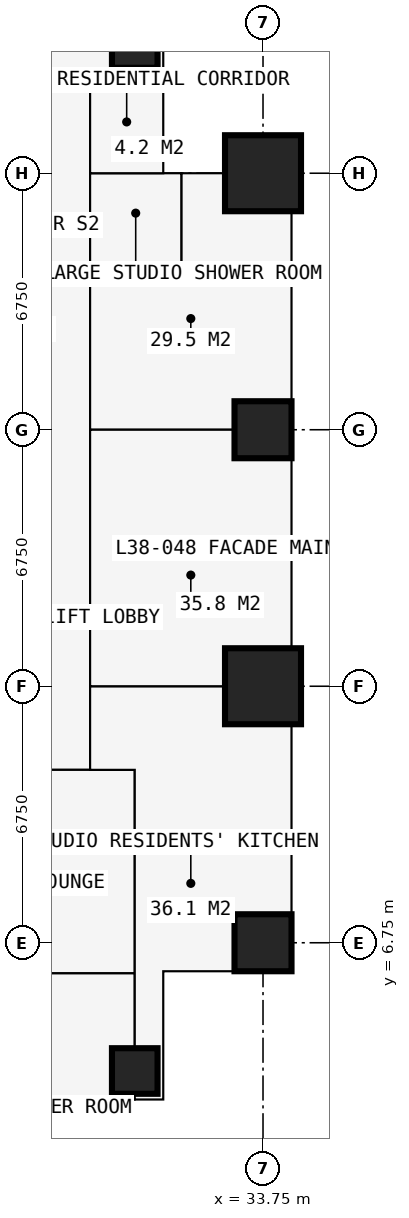
"""IFC4 building model, lengths in metres.
Left out: names, types, materials, properties, quantities, classifications, styles, units other than length and angle.
Written with IfcOpenShell. Run it as: python <this file> out.ifc"""

import sys

from ifc_helpers import new_model, si_unit, direction, frame, frame_2d, origin, origin_2d, place, context, subcontext, project, spatial, rectangle, extrude, element, fill, save


model = new_model("IFC4")
c1 = context("Model", 3, precision=1e-05, world=origin(), true_north=direction((0.0, 1.0)))
c2 = subcontext(c1, "Body", "Model", "MODEL_VIEW")
j1 = project(units=[si_unit("LENGTHUNIT", "METRE"), si_unit("PLANEANGLEUNIT", "RADIAN")], contexts=[c1])
p1 = place(None, origin())
s1 = spatial("IfcSite", under=j1, at=p1, CompositionType="ELEMENT")
p2 = place(p1, origin())
s2 = spatial("IfcBuilding", under=s1, at=p2, CompositionType="ELEMENT")
p3 = place(p2, frame((0.0, 0.0, 142.2)))
s3 = spatial("IfcBuildingStorey", under=s2, at=p3, CompositionType="ELEMENT", Elevation=142.2)
for number, where, z_axis, x_axis in (
    (1, (30.375, 3.375, 0.0), (0.0, 0.0, 1.0), (1.0, 0.0, 0.0)),
    (2, (30.375, 30.375, 0.0), (0.0, 0.0, 1.0), (1.0, 0.0, 0.0)),
):
    element("IfcColumn", number, at=place(p3, frame(where, z_axis=z_axis, x_axis=x_axis)), inside=s3, PredefinedType="COLUMN", context=c2, shape_type="SweptSolid", body=[
        extrude(rectangle(XDim=1.2, YDim=1.2, at=origin_2d()), origin(), (0.0, 0.0, 1.0), 3.6),
    ])
p4 = place(p3, frame((33.75, 6.75, 0.0), z_axis=(0.0, 0.0, 1.0), x_axis=(1.0, 0.0, 0.0)))
e3 = element("IfcColumn", 3, at=p4, inside=s3, PredefinedType="COLUMN", context=c2, shape_type="SweptSolid", body=[
    extrude(rectangle(XDim=1.5, YDim=1.5, at=origin_2d()), origin(), (0.0, 0.0, 1.0), 3.6),
])
p5 = place(p3, frame((33.75, 13.5, 0.0), z_axis=(0.0, 0.0, 1.0), x_axis=(1.0, 0.0, 0.0)))
e4 = element("IfcColumn", 4, at=p5, inside=s3, PredefinedType="COLUMN", context=c2, shape_type="SweptSolid", body=[
    extrude(rectangle(XDim=2.0, YDim=2.0, at=origin_2d()), origin(), (0.0, 0.0, 1.0), 3.6),
])
p6 = place(p3, frame((33.75, 20.25, 0.0), z_axis=(0.0, 0.0, 1.0), x_axis=(1.0, 0.0, 0.0)))
e5 = element("IfcColumn", 5, at=p6, inside=s3, PredefinedType="COLUMN", context=c2, shape_type="SweptSolid", body=[
    extrude(rectangle(XDim=1.5, YDim=1.5, at=origin_2d()), origin(), (0.0, 0.0, 1.0), 3.6),
])
p7 = place(p3, frame((33.75, 27.0, 0.0), z_axis=(0.0, 0.0, 1.0), x_axis=(1.0, 0.0, 0.0)))
e6 = element("IfcColumn", 6, at=p7, inside=s3, PredefinedType="COLUMN", context=c2, shape_type="SweptSolid", body=[
    extrude(rectangle(XDim=2.0, YDim=2.0, at=origin_2d()), origin(), (0.0, 0.0, 1.0), 3.6),
])
p8 = place(p3, frame((34.5, 20.25, 0.0), z_axis=(0.0, 0.0, 1.0), x_axis=(0.0, -1.0, 0.0)))
e7 = element("IfcWall", 7, at=p8, inside=s3, PredefinedType="SOLIDWALL", context=c2, shape_type="SweptSolid", body=[
    extrude(rectangle(XDim=6.75, YDim=0.15, at=frame_2d((3.375, 0.0))), origin(), (0.0, 0.0, 1.0), 3.375),
])
p9 = place(p8, frame((0.863, 0.0, 0.0)))
e8 = element("IfcOpeningElement", 8, at=p9, cuts=e7, PredefinedType="OPENING", context=c2, shape_type="SweptSolid", body=[
    extrude(rectangle(XDim=1.0, YDim=2.2, at=frame_2d((0.5, 1.1))), frame((0.0, 0.085, 0.0), z_axis=(0.0, -1.0, 0.0), x_axis=(1.0, 0.0, 0.0)), (0.0, 0.0, 1.0), 0.17),
])
p10 = place(p8, frame((1.975, 0.0, 0.9)))
e9 = element("IfcOpeningElement", 9, at=p10, cuts=e7, PredefinedType="OPENING", context=c2, shape_type="SweptSolid", body=[
    extrude(rectangle(XDim=1.2, YDim=1.8, at=frame_2d((0.6, 0.9))), frame((0.0, 0.085, 0.0), z_axis=(0.0, -1.0, 0.0), x_axis=(1.0, 0.0, 0.0)), (0.0, 0.0, 1.0), 0.17),
])
p11 = place(p8, frame((4.621, 0.0, 0.0)))
e10 = element("IfcOpeningElement", 10, at=p11, cuts=e7, PredefinedType="OPENING", context=c2, shape_type="SweptSolid", body=[
    extrude(rectangle(XDim=1.0, YDim=2.2, at=frame_2d((0.5, 1.1))), frame((0.0, 0.085, 0.0), z_axis=(0.0, -1.0, 0.0), x_axis=(1.0, 0.0, 0.0)), (0.0, 0.0, 1.0), 0.17),
])
p12 = place(p8, frame((3.592, 0.0, 0.9)))
e11 = element("IfcOpeningElement", 11, at=p12, cuts=e7, PredefinedType="OPENING", context=c2, shape_type="SweptSolid", body=[
    extrude(rectangle(XDim=0.9, YDim=1.8, at=frame_2d((0.45, 0.9))), frame((0.0, 0.085, 0.0), z_axis=(0.0, -1.0, 0.0), x_axis=(1.0, 0.0, 0.0)), (0.0, 0.0, 1.0), 0.17),
])
p13 = place(p3, frame((34.5, 27.75, 0.0), z_axis=(0.0, 0.0, 1.0), x_axis=(-1.0, 0.0, 0.0)))
e12 = element("IfcWall", 12, at=p13, inside=s3, PredefinedType="SOLIDWALL", context=c2, shape_type="SweptSolid", body=[
    extrude(rectangle(XDim=3.375, YDim=0.3, at=frame_2d((1.688, 0.0))), origin(), (0.0, 0.0, 1.0), 3.375),
])
p14 = place(p13, frame((1.883, 0.0, 0.9)))
e13 = element("IfcOpeningElement", 13, at=p14, cuts=e12, PredefinedType="OPENING", context=c2, shape_type="SweptSolid", body=[
    extrude(rectangle(XDim=1.2, YDim=1.8, at=frame_2d((0.6, 0.9))), frame((0.0, 0.16, 0.0), z_axis=(0.0, -1.0, 0.0), x_axis=(1.0, 0.0, 0.0)), (0.0, 0.0, 1.0), 0.32),
])
p15 = place(p3, frame((31.125, 27.75, 0.0), z_axis=(0.0, 0.0, 1.0), x_axis=(0.0, 1.0, 0.0)))
e14 = element("IfcWall", 14, at=p15, inside=s3, PredefinedType="SOLIDWALL", context=c2, shape_type="SweptSolid", body=[
    extrude(rectangle(XDim=3.375, YDim=0.3, at=frame_2d((1.688, 0.0))), origin(), (0.0, 0.0, 1.0), 3.375),
])
p16 = place(p15, frame((1.663, 0.0, 0.9)))
e15 = element("IfcOpeningElement", 15, at=p16, cuts=e14, PredefinedType="OPENING", context=c2, shape_type="SweptSolid", body=[
    extrude(rectangle(XDim=1.5, YDim=1.8, at=frame_2d((0.75, 0.9))), frame((0.0, 0.16, 0.0), z_axis=(0.0, -1.0, 0.0), x_axis=(1.0, 0.0, 0.0)), (0.0, 0.0, 1.0), 0.32),
])
p17 = place(p3, frame((27.75, 2.625, 0.0), z_axis=(0.0, 0.0, 1.0), x_axis=(1.0, 0.0, 0.0)))
e16 = element("IfcWall", 16, at=p17, inside=s3, PredefinedType="SOLIDWALL", context=c2, shape_type="SweptSolid", body=[
    extrude(rectangle(XDim=3.375, YDim=0.3, at=frame_2d((1.688, 0.0))), origin(), (0.0, 0.0, 1.0), 3.375),
])
p18 = place(p17, frame((0.788, 0.0, 0.6)))
e17 = element("IfcOpeningElement", 17, at=p18, cuts=e16, PredefinedType="OPENING", context=c2, shape_type="SweptSolid", body=[
    extrude(rectangle(XDim=1.8, YDim=2.1, at=frame_2d((0.9, 1.05))), frame((0.0, 0.16, 0.0), z_axis=(0.0, -1.0, 0.0), x_axis=(1.0, 0.0, 0.0)), (0.0, 0.0, 1.0), 0.32),
])
p19 = place(p3, frame((31.125, 2.625, 0.0), z_axis=(0.0, 0.0, 1.0), x_axis=(0.0, 1.0, 0.0)))
e18 = element("IfcWall", 18, at=p19, inside=s3, PredefinedType="SOLIDWALL", context=c2, shape_type="SweptSolid", body=[
    extrude(rectangle(XDim=3.375, YDim=0.3, at=frame_2d((1.688, 0.0))), origin(), (0.0, 0.0, 1.0), 3.375),
])
p20 = place(p19, frame((0.788, 0.0, 0.6)))
e19 = element("IfcOpeningElement", 19, at=p20, cuts=e18, PredefinedType="OPENING", context=c2, shape_type="SweptSolid", body=[
    extrude(rectangle(XDim=1.8, YDim=2.1, at=frame_2d((0.9, 1.05))), frame((0.0, 0.16, 0.0), z_axis=(0.0, -1.0, 0.0), x_axis=(1.0, 0.0, 0.0)), (0.0, 0.0, 1.0), 0.32),
])
p21 = place(p3, frame((31.125, 6.0, 0.0), z_axis=(0.0, 0.0, 1.0), x_axis=(1.0, 0.0, 0.0)))
e20 = element("IfcWall", 20, at=p21, inside=s3, PredefinedType="SOLIDWALL", context=c2, shape_type="SweptSolid", body=[
    extrude(rectangle(XDim=3.375, YDim=0.3, at=frame_2d((1.688, 0.0))), origin(), (0.0, 0.0, 1.0), 3.375),
])
p22 = place(p21, frame((0.268, 0.0, 0.9)))
e21 = element("IfcOpeningElement", 21, at=p22, cuts=e20, PredefinedType="OPENING", context=c2, shape_type="SweptSolid", body=[
    extrude(rectangle(XDim=1.5, YDim=1.8, at=frame_2d((0.75, 0.9))), frame((0.0, 0.16, 0.0), z_axis=(0.0, -1.0, 0.0), x_axis=(1.0, 0.0, 0.0)), (0.0, 0.0, 1.0), 0.32),
])
p23 = place(p3, frame((10.125, 11.3, 0.0), z_axis=(0.0, 0.0, 1.0), x_axis=(1.0, 0.0, 0.0)))
e22 = element("IfcWall", 22, at=p23, inside=s3, PredefinedType="PARTITIONING", context=c2, shape_type="SweptSolid", body=[
    extrude(rectangle(XDim=20.25, YDim=0.15, at=frame_2d((10.125, 0.0))), origin(), (0.0, 0.0, 1.0), 3.375),
])
p24 = place(p23, frame((11.312, 0.0, 0.0)))
e23 = element("IfcOpeningElement", 23, at=p24, cuts=e22, PredefinedType="OPENING", context=c2, shape_type="SweptSolid", body=[
    extrude(rectangle(XDim=1.0, YDim=2.2, at=frame_2d((0.5, 1.1))), frame((0.0, 0.085, 0.0), z_axis=(0.0, -1.0, 0.0), x_axis=(1.0, 0.0, 0.0)), (0.0, 0.0, 1.0), 0.17),
])
p25 = place(p3, frame((11.3, 29.2, 0.0), z_axis=(0.0, 0.0, 1.0), x_axis=(1.0, 0.0, 0.0)))
e24 = element("IfcWall", 24, at=p25, inside=s3, PredefinedType="PARTITIONING", context=c2, shape_type="SweptSolid", body=[
    extrude(rectangle(XDim=19.809, YDim=0.15, at=frame_2d((9.904, 0.0))), origin(), (0.0, 0.0, 1.0), 3.375),
])
p26 = place(p25, frame((12.9, 0.0, 0.0)))
e25 = element("IfcOpeningElement", 25, at=p26, cuts=e24, PredefinedType="OPENING", context=c2, shape_type="SweptSolid", body=[
    extrude(rectangle(XDim=1.0, YDim=2.2, at=frame_2d((0.5, 1.1))), frame((0.0, 0.085, 0.0), z_axis=(0.0, -1.0, 0.0), x_axis=(1.0, 0.0, 0.0)), (0.0, 0.0, 1.0), 0.17),
])
p27 = place(p25, frame((6.4, 0.0, 0.0)))
e26 = element("IfcOpeningElement", 26, at=p27, cuts=e24, PredefinedType="OPENING", context=c2, shape_type="SweptSolid", body=[
    extrude(rectangle(XDim=0.95, YDim=2.2, at=frame_2d((0.475, 1.1))), frame((0.0, 0.085, 0.0), z_axis=(0.0, -1.0, 0.0), x_axis=(1.0, 0.0, 0.0)), (0.0, 0.0, 1.0), 0.17),
])
p28 = place(p25, frame((0.6, 0.0, 0.0)))
e27 = element("IfcOpeningElement", 27, at=p28, cuts=e24, PredefinedType="OPENING", context=c2, shape_type="SweptSolid", body=[
    extrude(rectangle(XDim=1.0, YDim=2.2, at=frame_2d((0.5, 1.1))), frame((0.0, 0.085, 0.0), z_axis=(0.0, -1.0, 0.0), x_axis=(1.0, 0.0, 0.0)), (0.0, 0.0, 1.0), 0.17),
])
p29 = place(p3, frame((27.725, 5.95, 0.0), z_axis=(0.0, 0.0, 1.0), x_axis=(1.0, 0.0, 0.0)))
e28 = element("IfcWall", 28, at=p29, inside=s3, PredefinedType="PARTITIONING", context=c2, shape_type="SweptSolid", body=[
    extrude(rectangle(XDim=2.65, YDim=0.15, at=frame_2d((1.325, 0.0))), origin(), (0.0, 0.0, 1.0), 3.375),
])
p30 = place(p3, frame((29.2, 11.3, 0.0), z_axis=(0.0, 0.0, 1.0), x_axis=(0.0, 1.0, 0.0)))
e29 = element("IfcWall", 29, at=p30, inside=s3, PredefinedType="PARTITIONING", context=c2, shape_type="SweptSolid", body=[
    extrude(rectangle(XDim=17.9, YDim=0.2, at=frame_2d((8.95, 0.0))), origin(), (0.0, 0.0, 1.0), 3.375),
])
p31 = place(p30, frame((10.55, 0.0, 0.0)))
e30 = element("IfcOpeningElement", 30, at=p31, cuts=e29, PredefinedType="OPENING", context=c2, shape_type="SweptSolid", body=[
    extrude(rectangle(XDim=0.95, YDim=2.2, at=frame_2d((0.475, 1.1))), frame((0.0, 0.11, 0.0), z_axis=(0.0, -1.0, 0.0), x_axis=(1.0, 0.0, 0.0)), (0.0, 0.0, 1.0), 0.22),
])
p32 = place(p30, frame((16.3, 0.0, 0.0)))
e31 = element("IfcOpeningElement", 31, at=p32, cuts=e29, PredefinedType="OPENING", context=c2, shape_type="SweptSolid", body=[
    extrude(rectangle(XDim=1.0, YDim=2.2, at=frame_2d((0.5, 1.1))), frame((0.0, 0.11, 0.0), z_axis=(0.0, -1.0, 0.0), x_axis=(1.0, 0.0, 0.0)), (0.0, 0.0, 1.0), 0.22),
])
p33 = place(p30, frame((5.1, 0.0, 0.0)))
e32 = element("IfcOpeningElement", 32, at=p33, cuts=e29, PredefinedType="OPENING", context=c2, shape_type="SweptSolid", body=[
    extrude(rectangle(XDim=0.95, YDim=2.2, at=frame_2d((0.475, 1.1))), frame((0.0, 0.11, 0.0), z_axis=(0.0, -1.0, 0.0), x_axis=(1.0, 0.0, 0.0)), (0.0, 0.0, 1.0), 0.22),
])
for number, where, z_axis, x_axis in (
    (33, (29.2, 13.5, 0.0), (0.0, 0.0, 1.0), (1.0, 0.0, 0.0)),
    (34, (29.2, 20.25, 0.0), (0.0, 0.0, 1.0), (1.0, 0.0, 0.0)),
):
    element("IfcWall", number, at=place(p3, frame(where, z_axis=z_axis, x_axis=x_axis)), inside=s3, PredefinedType="PARTITIONING", context=c2, shape_type="SweptSolid", body=[
        extrude(rectangle(XDim=5.284, YDim=0.15, at=frame_2d((2.642, 0.0))), origin(), (0.0, 0.0, 1.0), 2.806),
    ])
p34 = place(p3, frame((29.2, 24.4, 0.0), z_axis=(0.0, 0.0, 1.0), x_axis=(1.0, 0.0, 0.0)))
e35 = element("IfcWall", 35, at=p34, inside=s3, PredefinedType="PARTITIONING", context=c2, shape_type="SweptSolid", body=[
    extrude(rectangle(XDim=2.4, YDim=0.1, at=frame_2d((1.2, 0.0))), origin(), (0.0, 0.0, 1.0), 3.375),
])
p35 = place(p3, frame((29.2, 27.0, 0.0), z_axis=(0.0, 0.0, 1.0), x_axis=(1.0, 0.0, 0.0)))
e36 = element("IfcWall", 36, at=p35, inside=s3, PredefinedType="PARTITIONING", context=c2, shape_type="SweptSolid", body=[
    extrude(rectangle(XDim=5.284, YDim=0.175, at=frame_2d((2.642, 0.0))), origin(), (0.0, 0.0, 1.0), 2.806),
])
p36 = place(p3, frame((30.375, 2.775, 0.0), z_axis=(0.0, 0.0, 1.0), x_axis=(0.0, 1.0, 0.0)))
e37 = element("IfcWall", 37, at=p36, inside=s3, PredefinedType="PARTITIONING", context=c2, shape_type="SweptSolid", body=[
    extrude(rectangle(XDim=8.525, YDim=0.15, at=frame_2d((4.263, 0.0))), origin(), (0.0, 0.0, 1.0), 2.877),
])
p37 = place(p36, frame((1.216, 0.0, 0.0)))
e38 = element("IfcOpeningElement", 38, at=p37, cuts=e37, PredefinedType="OPENING", context=c2, shape_type="SweptSolid", body=[
    extrude(rectangle(XDim=1.0, YDim=2.2, at=frame_2d((0.5, 1.1))), frame((0.0, 0.085, 0.0), z_axis=(0.0, -1.0, 0.0), x_axis=(1.0, 0.0, 0.0)), (0.0, 0.0, 1.0), 0.17),
])
p38 = place(p3, frame((31.125, 27.0, 0.0), z_axis=(0.0, 0.0, 1.0), x_axis=(0.0, 1.0, 0.0)))
e39 = element("IfcWall", 39, at=p38, inside=s3, PredefinedType="PARTITIONING", context=c2, shape_type="SweptSolid", body=[
    extrude(rectangle(XDim=0.734, YDim=0.15, at=frame_2d((0.367, 0.0))), origin(), (0.0, 0.0, 1.0), 3.375),
])
p39 = place(p3, frame((31.6, 24.4, 0.0), z_axis=(0.0, 0.0, 1.0), x_axis=(0.0, 1.0, 0.0)))
e40 = element("IfcWall", 40, at=p39, inside=s3, PredefinedType="PARTITIONING", context=c2, shape_type="SweptSolid", body=[
    extrude(rectangle(XDim=2.6, YDim=0.1, at=frame_2d((1.3, 0.0))), origin(), (0.0, 0.0, 1.0), 3.375),
])
p40 = place(p39, frame((0.85, 0.0, 0.0)))
e41 = element("IfcOpeningElement", 41, at=p40, cuts=e40, PredefinedType="OPENING", context=c2, shape_type="SweptSolid", body=[
    extrude(rectangle(XDim=0.9, YDim=2.2, at=frame_2d((0.45, 1.1))), frame((0.0, 0.06, 0.0), z_axis=(0.0, -1.0, 0.0), x_axis=(1.0, 0.0, 0.0)), (0.0, 0.0, 1.0), 0.12),
])
p41 = place(p9, origin())
e42 = element("IfcDoor", 42, at=p41, inside=s3, OperationType="SINGLE_SWING_LEFT", PredefinedType="DOOR", context=c2, shape_type="SweptSolid", body=[
    extrude(rectangle(XDim=1.0, YDim=2.2, at=frame_2d((0.5, 1.1))), frame((0.0, 0.025, 0.0), z_axis=(0.0, -1.0, 0.0), x_axis=(1.0, 0.0, 0.0)), (0.0, 0.0, 1.0), 0.05),
])
fill(e8, e42)
p42 = place(p10, origin())
e43 = element("IfcWindow", 43, at=p42, inside=s3, PartitioningType="SINGLE_PANEL", PredefinedType="WINDOW", context=c2, shape_type="SweptSolid", body=[
    extrude(rectangle(XDim=1.2, YDim=1.8, at=frame_2d((0.6, 0.9))), frame((0.0, 0.03, 0.0), z_axis=(0.0, -1.0, 0.0), x_axis=(1.0, 0.0, 0.0)), (0.0, 0.0, 1.0), 0.06),
])
fill(e9, e43)
p43 = place(p11, origin())
e44 = element("IfcDoor", 44, at=p43, inside=s3, OperationType="SINGLE_SWING_RIGHT", PredefinedType="DOOR", context=c2, shape_type="SweptSolid", body=[
    extrude(rectangle(XDim=1.0, YDim=2.2, at=frame_2d((0.5, 1.1))), frame((0.0, 0.025, 0.0), z_axis=(0.0, -1.0, 0.0), x_axis=(1.0, 0.0, 0.0)), (0.0, 0.0, 1.0), 0.05),
])
fill(e10, e44)
p44 = place(p12, origin())
e45 = element("IfcWindow", 45, at=p44, inside=s3, PartitioningType="SINGLE_PANEL", PredefinedType="WINDOW", context=c2, shape_type="SweptSolid", body=[
    extrude(rectangle(XDim=0.9, YDim=1.8, at=frame_2d((0.45, 0.9))), frame((0.0, 0.03, 0.0), z_axis=(0.0, -1.0, 0.0), x_axis=(1.0, 0.0, 0.0)), (0.0, 0.0, 1.0), 0.06),
])
fill(e11, e45)
p45 = place(p14, origin())
e46 = element("IfcWindow", 46, at=p45, inside=s3, PartitioningType="SINGLE_PANEL", PredefinedType="WINDOW", context=c2, shape_type="SweptSolid", body=[
    extrude(rectangle(XDim=1.2, YDim=1.8, at=frame_2d((0.6, 0.9))), frame((0.0, 0.03, 0.0), z_axis=(0.0, -1.0, 0.0), x_axis=(1.0, 0.0, 0.0)), (0.0, 0.0, 1.0), 0.06),
])
fill(e13, e46)
p46 = place(p16, origin())
e47 = element("IfcWindow", 47, at=p46, inside=s3, PartitioningType="SINGLE_PANEL", PredefinedType="WINDOW", context=c2, shape_type="SweptSolid", body=[
    extrude(rectangle(XDim=1.5, YDim=1.8, at=frame_2d((0.75, 0.9))), frame((0.0, 0.03, 0.0), z_axis=(0.0, -1.0, 0.0), x_axis=(1.0, 0.0, 0.0)), (0.0, 0.0, 1.0), 0.06),
])
fill(e15, e47)
p47 = place(p18, origin())
e48 = element("IfcWindow", 48, at=p47, inside=s3, PartitioningType="SINGLE_PANEL", PredefinedType="WINDOW", context=c2, shape_type="SweptSolid", body=[
    extrude(rectangle(XDim=1.8, YDim=2.1, at=frame_2d((0.9, 1.05))), frame((0.0, 0.03, 0.0), z_axis=(0.0, -1.0, 0.0), x_axis=(1.0, 0.0, 0.0)), (0.0, 0.0, 1.0), 0.06),
])
fill(e17, e48)
p48 = place(p20, origin())
e49 = element("IfcWindow", 49, at=p48, inside=s3, PartitioningType="SINGLE_PANEL", PredefinedType="WINDOW", context=c2, shape_type="SweptSolid", body=[
    extrude(rectangle(XDim=1.8, YDim=2.1, at=frame_2d((0.9, 1.05))), frame((0.0, 0.03, 0.0), z_axis=(0.0, -1.0, 0.0), x_axis=(1.0, 0.0, 0.0)), (0.0, 0.0, 1.0), 0.06),
])
fill(e19, e49)
p49 = place(p22, origin())
e50 = element("IfcWindow", 50, at=p49, inside=s3, PartitioningType="SINGLE_PANEL", PredefinedType="WINDOW", context=c2, shape_type="SweptSolid", body=[
    extrude(rectangle(XDim=1.5, YDim=1.8, at=frame_2d((0.75, 0.9))), frame((0.0, 0.03, 0.0), z_axis=(0.0, -1.0, 0.0), x_axis=(1.0, 0.0, 0.0)), (0.0, 0.0, 1.0), 0.06),
])
fill(e21, e50)
p50 = place(p37, origin())
e51 = element("IfcDoor", 51, at=p50, inside=s3, OperationType="SINGLE_SWING_LEFT", PredefinedType="DOOR", context=c2, shape_type="SweptSolid", body=[
    extrude(rectangle(XDim=1.0, YDim=2.2, at=frame_2d((0.5, 1.1))), frame((0.0, 0.025, 0.0), z_axis=(0.0, -1.0, 0.0), x_axis=(1.0, 0.0, 0.0)), (0.0, 0.0, 1.0), 0.05),
])
fill(e38, e51)
p51 = place(p31, origin())
e52 = element("IfcDoor", 52, at=p51, inside=s3, OperationType="SINGLE_SWING_LEFT", PredefinedType="DOOR", context=c2, shape_type="SweptSolid", body=[
    extrude(rectangle(XDim=0.95, YDim=2.2, at=frame_2d((0.475, 1.1))), frame((0.0, 0.025, 0.0), z_axis=(0.0, -1.0, 0.0), x_axis=(1.0, 0.0, 0.0)), (0.0, 0.0, 1.0), 0.05),
])
fill(e30, e52)
p52 = place(p40, origin())
e53 = element("IfcDoor", 53, at=p52, inside=s3, OperationType="SINGLE_SWING_RIGHT", PredefinedType="DOOR", context=c2, shape_type="SweptSolid", body=[
    extrude(rectangle(XDim=0.9, YDim=2.2, at=frame_2d((0.45, 1.1))), frame((0.0, 0.025, 0.0), z_axis=(0.0, -1.0, 0.0), x_axis=(1.0, 0.0, 0.0)), (0.0, 0.0, 1.0), 0.05),
])
fill(e41, e53)
p53 = place(p32, origin())
e54 = element("IfcDoor", 54, at=p53, inside=s3, OperationType="SINGLE_SWING_LEFT", PredefinedType="DOOR", context=c2, shape_type="SweptSolid", body=[
    extrude(rectangle(XDim=1.0, YDim=2.2, at=frame_2d((0.5, 1.1))), frame((0.0, 0.025, 0.0), z_axis=(0.0, -1.0, 0.0), x_axis=(1.0, 0.0, 0.0)), (0.0, 0.0, 1.0), 0.05),
])
fill(e31, e54)
p54 = place(p33, origin())
e55 = element("IfcDoor", 55, at=p54, inside=s3, OperationType="SINGLE_SWING_LEFT", PredefinedType="DOOR", context=c2, shape_type="SweptSolid", body=[
    extrude(rectangle(XDim=0.95, YDim=2.2, at=frame_2d((0.475, 1.1))), frame((0.0, 0.025, 0.0), z_axis=(0.0, -1.0, 0.0), x_axis=(1.0, 0.0, 0.0)), (0.0, 0.0, 1.0), 0.05),
])
fill(e32, e55)
save(model, sys.argv[1])
